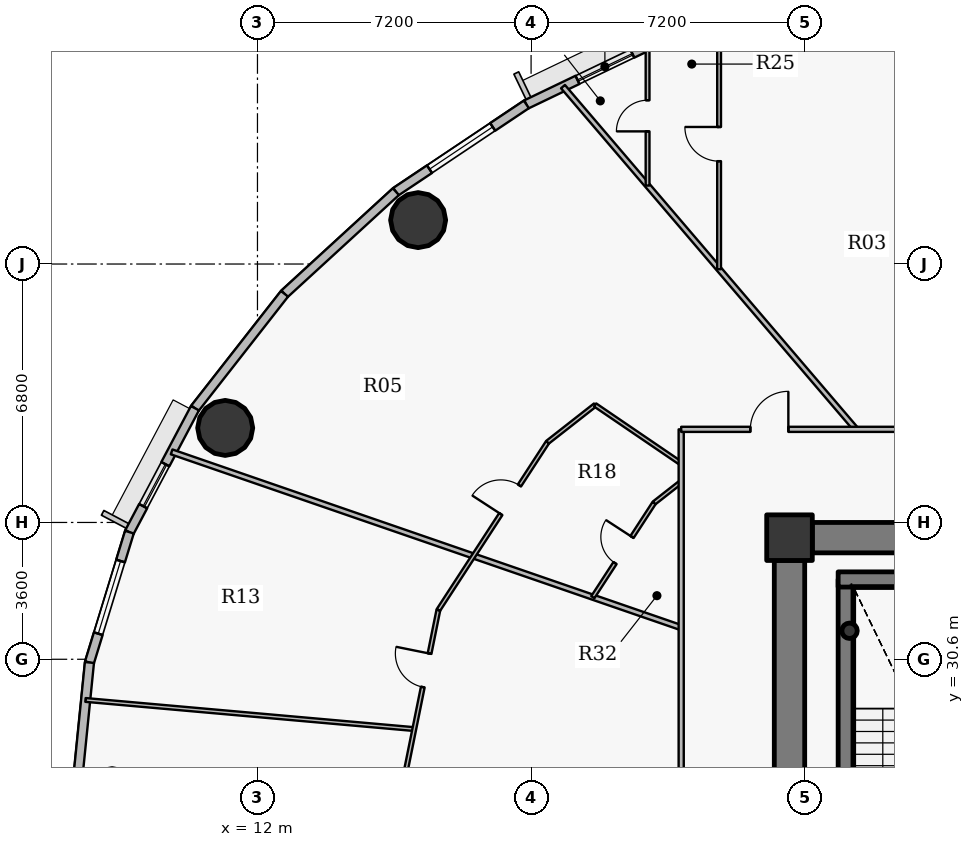
"""IFC4 building model, lengths in metres.
Left out: names, types, materials, properties, quantities, classifications, styles, units other than length and angle.
Written with IfcOpenShell. Run it as: python <this file> out.ifc"""

import sys

from ifc_helpers import new_model, si_unit, direction, frame, frame_2d, origin, origin_2d, place, context, subcontext, project, spatial, rectangle, hollow_circle, extrude, source, transform, mapped, element, fill, save


model = new_model("IFC4")
c1 = context("Model", 3, precision=1e-05, world=origin(), true_north=direction((0.0, 1.0)))
c2 = subcontext(c1, "Body", "Model", "MODEL_VIEW")
j1 = project(units=[si_unit("LENGTHUNIT", "METRE"), si_unit("PLANEANGLEUNIT", "RADIAN")], contexts=[c1])
p1 = place(None, origin())
s1 = spatial("IfcSite", under=j1, at=p1, CompositionType="ELEMENT")
p2 = place(p1, origin())
s2 = spatial("IfcBuilding", under=s1, at=p2, CompositionType="ELEMENT")
p3 = place(p2, frame((0.0, 0.0, 100.95)))
s3 = spatial("IfcBuildingStorey", under=s2, at=p3, CompositionType="ELEMENT", Elevation=100.95)
p4 = place(p3, frame((26.0, 33.8, 0.0), z_axis=(0.0, 0.0, 1.0), x_axis=(1.0, 0.0, 0.0)))
e1 = element("IfcColumn", 1, at=p4, inside=s3, PredefinedType="COLUMN", context=c2, shape_type="SweptSolid", body=[
    extrude(rectangle(XDim=1.2, YDim=1.2, at=origin_2d()), origin(), (0.0, 0.0, 1.0), 3.75),
])
p5 = place(p3, frame((27.48, 24.1, 0.0), z_axis=(0.0, 0.0, 1.0), x_axis=(0.0, 1.0, 0.0)))
e2 = element("IfcWall", 2, at=p5, inside=s3, PredefinedType="SHEAR", context=c2, shape_type="SweptSolid", body=[
    extrude(rectangle(XDim=8.6, YDim=0.4, at=frame_2d((4.3, 0.0))), origin(), (0.0, 0.0, 1.0), 3.75),
])
p6 = place(p3, frame((27.28, 32.7, 0.0), z_axis=(0.0, 0.0, 1.0), x_axis=(1.0, 0.0, 0.0)))
e3 = element("IfcWall", 3, at=p6, inside=s3, PredefinedType="SHEAR", context=c2, shape_type="SweptSolid", body=[
    extrude(rectangle(XDim=4.1, YDim=0.4, at=frame_2d((2.05, 0.0))), origin(), (0.0, 0.0, 1.0), 3.75),
])
p7 = place(p3, frame((27.58, 31.35, 0.0), z_axis=(0.0, 0.0, 1.0), x_axis=(1.0, 0.0, 0.0)))
e4 = element("IfcColumn", 4, at=p7, inside=s3, PredefinedType="COLUMN", context=c2, shape_type="SweptSolid", body=[
    extrude(hollow_circle(Radius=0.203, WallThickness=0.016, at=origin_2d()), origin(), (0.0, 0.0, 1.0), 3.75),
])
p8 = place(p3, frame((26.6, 33.8, 0.0), z_axis=(0.0, 0.0, 1.0), x_axis=(1.0, 0.0, 0.0)))
e5 = element("IfcWall", 5, at=p8, inside=s3, PredefinedType="SHEAR", context=c2, shape_type="SweptSolid", body=[
    extrude(rectangle(XDim=18.8, YDim=0.8, at=frame_2d((9.4, 0.0))), origin(), (0.0, 0.0, 1.0), 2.95),
])
p9 = place(p3, frame((26.0, 20.8, 0.0), z_axis=(0.0, 0.0, 1.0), x_axis=(0.0, 1.0, 0.0)))
e6 = element("IfcWall", 6, at=p9, inside=s3, PredefinedType="SHEAR", context=c2, shape_type="SweptSolid", body=[
    extrude(rectangle(XDim=12.4, YDim=0.8, at=frame_2d((6.2, 0.0))), origin(), (0.0, 0.0, 1.0), 2.95),
])
p10 = place(p9, frame((5.79, 0.0, 0.0)))
e7 = element("IfcOpeningElement", 7, at=p10, cuts=e6, PredefinedType="OPENING", context=c2, shape_type="SweptSolid", body=[
    extrude(rectangle(XDim=0.82, YDim=2.1, at=origin_2d()), frame((0.41, 0.41, 1.05), z_axis=(0.0, -1.0, 0.0), x_axis=(1.0, 0.0, 0.0)), (0.0, 0.0, 1.0), 0.82),
])
for number, where, z_axis, x_axis in (
    (8, (16.227, 42.156, 0.0), (0.0, 0.0, 1.0), (1.0, 0.0, 0.0)),
    (9, (11.151, 36.688, 0.0), (0.0, 0.0, 1.0), (1.0, 0.0, 0.0)),
):
    element("IfcColumn", number, at=place(p3, frame(where, z_axis=z_axis, x_axis=x_axis)), inside=s3, PredefinedType="COLUMN", context=c2, shape_type="SweptSolid", body=[
        extrude(hollow_circle(Radius=0.725, WallThickness=0.042, at=origin_2d()), origin(), (0.0, 0.0, 1.0), 3.75),
    ])
p11 = place(p3, frame((19.075, 45.199, 0.0), z_axis=(0.0, 0.0, 1.0), x_axis=(0.901589935876, 0.432591709962, 0.0)))
e10 = element("IfcWall", 10, at=p11, inside=s3, PredefinedType="SOLIDWALL", context=c2, shape_type="SweptSolid", body=[
    extrude(rectangle(XDim=4.272, YDim=0.24, at=frame_2d((2.136, 0.0))), origin(), (0.0, 0.0, 1.0), 3.5),
])
p12 = place(p11, frame((1.493, 0.0, 0.9)))
e11 = element("IfcOpeningElement", 11, at=p12, cuts=e10, PredefinedType="OPENING", context=c2, shape_type="SweptSolid", body=[
    extrude(rectangle(XDim=1.6, YDim=1.75, at=origin_2d()), frame((0.8, 0.13, 0.875), z_axis=(0.0, -1.0, 0.0), x_axis=(1.0, 0.0, 0.0)), (0.0, 0.0, 1.0), 0.26),
])
p13 = place(p3, frame((15.642, 42.903, 0.0), z_axis=(0.0, 0.0, 1.0), x_axis=(0.831221811447, 0.555940914284, 0.0)))
e12 = element("IfcWall", 12, at=p13, inside=s3, PredefinedType="SOLIDWALL", context=c2, shape_type="SweptSolid", body=[
    extrude(rectangle(XDim=4.13, YDim=0.24, at=frame_2d((2.065, 0.0))), origin(), (0.0, 0.0, 1.0), 3.5),
])
p14 = place(p13, frame((1.065, 0.0, 0.9)))
e13 = element("IfcOpeningElement", 13, at=p14, cuts=e12, PredefinedType="OPENING", context=c2, shape_type="SweptSolid", body=[
    extrude(rectangle(XDim=2.0, YDim=1.75, at=origin_2d()), frame((1.0, 0.13, 0.875), z_axis=(0.0, -1.0, 0.0), x_axis=(1.0, 0.0, 0.0)), (0.0, 0.0, 1.0), 0.26),
])
p15 = place(p3, frame((12.711, 40.217, 0.0), z_axis=(0.0, 0.0, 1.0), x_axis=(0.737113356241, 0.675769117414, 0.0)))
e14 = element("IfcWall", 14, at=p15, inside=s3, PredefinedType="SOLIDWALL", context=c2, shape_type="SweptSolid", body=[
    extrude(rectangle(XDim=3.976, YDim=0.24, at=frame_2d((1.988, 0.0))), origin(), (0.0, 0.0, 1.0), 3.5),
])
p16 = place(p3, frame((10.355, 37.206, 0.0), z_axis=(0.0, 0.0, 1.0), x_axis=(0.616272103517, 0.787533297345, 0.0)))
e15 = element("IfcWall", 15, at=p16, inside=s3, PredefinedType="SOLIDWALL", context=c2, shape_type="SweptSolid", body=[
    extrude(rectangle(XDim=3.823, YDim=0.24, at=frame_2d((1.912, 0.0))), origin(), (0.0, 0.0, 1.0), 3.5),
])
p17 = place(p3, frame((8.63, 33.945, 0.0), z_axis=(0.0, 0.0, 1.0), x_axis=(0.467614004126, 0.883932770716, 0.0)))
e16 = element("IfcWall", 16, at=p17, inside=s3, PredefinedType="SOLIDWALL", context=c2, shape_type="SweptSolid", body=[
    extrude(rectangle(XDim=3.689, YDim=0.24, at=frame_2d((1.844, 0.0))), origin(), (0.0, 0.0, 1.0), 3.5),
])
p18 = place(p17, frame((0.774, 0.0, 0.9)))
e17 = element("IfcOpeningElement", 17, at=p18, cuts=e16, PredefinedType="OPENING", context=c2, shape_type="SweptSolid", body=[
    extrude(rectangle(XDim=1.25, YDim=1.65, at=origin_2d()), frame((0.625, 0.13, 0.825), z_axis=(0.0, -1.0, 0.0), x_axis=(1.0, 0.0, 0.0)), (0.0, 0.0, 1.0), 0.26),
])
p19 = place(p3, frame((7.578, 30.515, 0.0), z_axis=(0.0, 0.0, 1.0), x_axis=(0.293124431344, 0.956074300329, 0.0)))
e18 = element("IfcWall", 18, at=p19, inside=s3, PredefinedType="SOLIDWALL", context=c2, shape_type="SweptSolid", body=[
    extrude(rectangle(XDim=3.587, YDim=0.24, at=frame_2d((1.793, 0.0))), origin(), (0.0, 0.0, 1.0), 3.5),
])
p20 = place(p19, frame((0.794, 0.0, 0.9)))
e19 = element("IfcOpeningElement", 19, at=p20, cuts=e18, PredefinedType="OPENING", context=c2, shape_type="SweptSolid", body=[
    extrude(rectangle(XDim=2.0, YDim=1.75, at=origin_2d()), frame((1.0, 0.13, 0.875), z_axis=(0.0, -1.0, 0.0), x_axis=(1.0, 0.0, 0.0)), (0.0, 0.0, 1.0), 0.26),
])
p21 = place(p3, frame((7.225, 27.0, 0.0), z_axis=(0.0, 0.0, 1.0), x_axis=(0.099989468229, 0.994988495533, 0.0)))
e20 = element("IfcWall", 20, at=p21, inside=s3, PredefinedType="SOLIDWALL", context=c2, shape_type="SweptSolid", body=[
    extrude(rectangle(XDim=3.533, YDim=0.24, at=frame_2d((1.767, 0.0))), origin(), (0.0, 0.0, 1.0), 3.5),
])
p22 = place(p3, frame((7.474, 29.53, 0.0), z_axis=(0.0, 0.0, 1.0), x_axis=(0.99609030315, -0.088340862406, 0.0)))
e21 = element("IfcWall", 21, at=p22, inside=s3, PredefinedType="PARTITIONING", context=c2, shape_type="SweptSolid", body=[
    extrude(rectangle(XDim=8.686, YDim=0.1, at=frame_2d((4.343, 0.0))), origin(), (0.0, 0.0, 1.0), 2.935),
])
p23 = place(p3, frame((9.741, 36.057, 0.0), z_axis=(0.0, 0.0, 1.0), x_axis=(0.945349748634, -0.326058051207, 0.0)))
e22 = element("IfcWall", 22, at=p23, inside=s3, PredefinedType="PARTITIONING", context=c2, shape_type="SweptSolid", body=[
    extrude(rectangle(XDim=14.184, YDim=0.135, at=frame_2d((7.092, 0.0))), origin(), (0.0, 0.0, 1.0), 2.935),
])
p24 = place(p3, frame((15.77, 27.0, 0.0), z_axis=(0.0, 0.0, 1.0), x_axis=(0.198230919145, 0.980155346205, 0.0)))
e23 = element("IfcWall", 23, at=p24, inside=s3, PredefinedType="PARTITIONING", context=c2, shape_type="SweptSolid", body=[
    extrude(rectangle(XDim=4.994, YDim=0.1, at=frame_2d((2.497, 0.0))), origin(), (0.0, 0.0, 1.0), 2.935),
])
p25 = place(p24, frame((2.926, 0.0, 0.0)))
e24 = element("IfcOpeningElement", 24, at=p25, cuts=e23, PredefinedType="OPENING", context=c2, shape_type="SweptSolid", body=[
    extrude(rectangle(XDim=0.9, YDim=2.1, at=origin_2d()), frame((0.45, 0.06, 1.05), z_axis=(0.0, -1.0, 0.0), x_axis=(1.0, 0.0, 0.0)), (0.0, 0.0, 1.0), 0.12),
])
p26 = place(p3, frame((16.76, 31.895, 0.0), z_axis=(0.0, 0.0, 1.0), x_axis=(0.545405249109, 0.838172484781, 0.0)))
e25 = element("IfcWall", 25, at=p26, inside=s3, PredefinedType="PARTITIONING", context=c2, shape_type="SweptSolid", body=[
    extrude(rectangle(XDim=5.269, YDim=0.1, at=frame_2d((2.634, 0.0))), origin(), (0.0, 0.0, 1.0), 2.935),
])
p27 = place(p26, frame((3.012, 0.0, 0.0)))
e26 = element("IfcOpeningElement", 26, at=p27, cuts=e25, PredefinedType="OPENING", context=c2, shape_type="SweptSolid", body=[
    extrude(rectangle(XDim=0.9, YDim=2.1, at=origin_2d()), frame((0.45, 0.06, 1.05), z_axis=(0.0, -1.0, 0.0), x_axis=(1.0, 0.0, 0.0)), (0.0, 0.0, 1.0), 0.12),
])
p28 = place(p3, frame((19.634, 36.311, 0.0), z_axis=(0.0, 0.0, 1.0), x_axis=(0.787313775385, 0.616552527437, 0.0)))
e27 = element("IfcWall", 27, at=p28, inside=s3, PredefinedType="PARTITIONING", context=c2, shape_type="SweptSolid", body=[
    extrude(rectangle(XDim=1.59, YDim=0.1, at=frame_2d((0.795, 0.0))), origin(), (0.0, 0.0, 1.0), 3.5),
])
p29 = place(p3, frame((20.04, 45.668, 0.0), z_axis=(0.0, 0.0, 1.0), x_axis=(0.649828321201, -0.760081017369, 0.0)))
e28 = element("IfcWall", 28, at=p29, inside=s3, PredefinedType="PARTITIONING", context=c2, shape_type="SweptSolid", body=[
    extrude(rectangle(XDim=11.865, YDim=0.135, at=frame_2d((5.932, 0.0))), origin(), (0.0, 0.0, 1.0), 2.935),
])
p30 = place(p3, frame((20.825, 32.234, 0.0), z_axis=(0.0, 0.0, 1.0), x_axis=(0.545376787896, 0.838191004023, 0.0)))
e29 = element("IfcWall", 29, at=p30, inside=s3, PredefinedType="PARTITIONING", context=c2, shape_type="SweptSolid", body=[
    extrude(rectangle(XDim=2.96, YDim=0.1, at=frame_2d((1.48, 0.0))), origin(), (0.0, 0.0, 1.0), 2.935),
])
p31 = place(p30, frame((1.07, 0.0, 0.0)))
e30 = element("IfcOpeningElement", 30, at=p31, cuts=e29, PredefinedType="OPENING", context=c2, shape_type="SweptSolid", body=[
    extrude(rectangle(XDim=0.82, YDim=2.1, at=origin_2d()), frame((0.41, 0.06, 1.05), z_axis=(0.0, -1.0, 0.0), x_axis=(1.0, 0.0, 0.0)), (0.0, 0.0, 1.0), 0.12),
])
p32 = place(p3, frame((20.885, 37.291, 0.0), z_axis=(0.0, 0.0, 1.0), x_axis=(0.826581607155, -0.562816885596, 0.0)))
e31 = element("IfcWall", 31, at=p32, inside=s3, PredefinedType="PARTITIONING", context=c2, shape_type="SweptSolid", body=[
    extrude(rectangle(XDim=2.74, YDim=0.1, at=frame_2d((1.37, 0.0))), origin(), (0.0, 0.0, 1.0), 3.5),
])
p33 = place(p3, frame((22.265, 43.064, 0.0), z_axis=(0.0, 0.0, 1.0), x_axis=(0.0, 1.0, 0.0)))
e32 = element("IfcWall", 32, at=p33, inside=s3, PredefinedType="PARTITIONING", context=c2, shape_type="SweptSolid", body=[
    extrude(rectangle(XDim=3.671, YDim=0.1, at=frame_2d((1.836, 0.0))), origin(), (0.0, 0.0, 1.0), 2.935),
])
p34 = place(p33, frame((1.426, 0.0, 0.0)))
e33 = element("IfcOpeningElement", 33, at=p34, cuts=e32, PredefinedType="OPENING", context=c2, shape_type="SweptSolid", body=[
    extrude(rectangle(XDim=0.82, YDim=2.1, at=origin_2d()), frame((0.41, 0.06, 1.05), z_axis=(0.0, -1.0, 0.0), x_axis=(1.0, 0.0, 0.0)), (0.0, 0.0, 1.0), 0.12),
])
p35 = place(p3, frame((22.439, 34.715, 0.0), z_axis=(0.0, 0.0, 1.0), x_axis=(0.787265250498, 0.616614486821, 0.0)))
e34 = element("IfcWall", 34, at=p35, inside=s3, PredefinedType="PARTITIONING", context=c2, shape_type="SweptSolid", body=[
    extrude(rectangle(XDim=0.903, YDim=0.1, at=frame_2d((0.451, 0.0))), origin(), (0.0, 0.0, 1.0), 3.5),
])
p36 = place(p3, frame((23.15, 17.35, 0.0), z_axis=(0.0, 0.0, 1.0), x_axis=(0.0, 1.0, 0.0)))
e35 = element("IfcWall", 35, at=p36, inside=s3, PredefinedType="PARTITIONING", context=c2, shape_type="SweptSolid", body=[
    extrude(rectangle(XDim=19.3, YDim=0.135, at=frame_2d((9.65, 0.0))), origin(), (0.0, 0.0, 1.0), 2.935),
])
p37 = place(p36, frame((7.86, 0.0, 0.0)))
e36 = element("IfcOpeningElement", 36, at=p37, cuts=e35, PredefinedType="OPENING", context=c2, shape_type="SweptSolid", body=[
    extrude(rectangle(XDim=1.0, YDim=2.15, at=origin_2d()), frame((0.5, 0.078, 1.075), z_axis=(0.0, -1.0, 0.0), x_axis=(1.0, 0.0, 0.0)), (0.0, 0.0, 1.0), 0.155),
])
p38 = place(p3, frame((23.15, 36.65, 0.0), z_axis=(0.0, 0.0, 1.0), x_axis=(1.0, 0.0, 0.0)))
e37 = element("IfcWall", 37, at=p38, inside=s3, PredefinedType="PARTITIONING", context=c2, shape_type="SweptSolid", body=[
    extrude(rectangle(XDim=10.373, YDim=0.135, at=frame_2d((5.187, 0.0))), origin(), (0.0, 0.0, 1.0), 2.935),
])
p39 = place(p38, frame((6.966, 0.0, 0.0)))
e38 = element("IfcOpeningElement", 38, at=p39, cuts=e37, PredefinedType="OPENING", context=c2, shape_type="SweptSolid", body=[
    extrude(rectangle(XDim=1.0, YDim=2.15, at=origin_2d()), frame((0.5, 0.078, 1.075), z_axis=(0.0, -1.0, 0.0), x_axis=(1.0, 0.0, 0.0)), (0.0, 0.0, 1.0), 0.155),
])
p40 = place(p38, frame((1.82, 0.0, 0.0)))
e39 = element("IfcOpeningElement", 39, at=p40, cuts=e37, PredefinedType="OPENING", context=c2, shape_type="SweptSolid", body=[
    extrude(rectangle(XDim=1.0, YDim=2.15, at=origin_2d()), frame((0.5, 0.078, 1.075), z_axis=(0.0, -1.0, 0.0), x_axis=(1.0, 0.0, 0.0)), (0.0, 0.0, 1.0), 0.155),
])
p41 = place(p3, frame((24.147, 40.864, 0.0), z_axis=(0.0, 0.0, 1.0), x_axis=(0.0, 1.0, 0.0)))
e40 = element("IfcWall", 40, at=p41, inside=s3, PredefinedType="PARTITIONING", context=c2, shape_type="SweptSolid", body=[
    extrude(rectangle(XDim=6.585, YDim=0.1, at=frame_2d((3.292, 0.0))), origin(), (0.0, 0.0, 1.0), 2.935),
])
p42 = place(p41, frame((2.843, 0.0, 0.0)))
e41 = element("IfcOpeningElement", 41, at=p42, cuts=e40, PredefinedType="OPENING", context=c2, shape_type="SweptSolid", body=[
    extrude(rectangle(XDim=0.9, YDim=2.1, at=origin_2d()), frame((0.45, 0.06, 1.05), z_axis=(0.0, -1.0, 0.0), x_axis=(1.0, 0.0, 0.0)), (0.0, 0.0, 1.0), 0.12),
])
p43 = place(p3, frame((26.59, 34.2, 0.0), z_axis=(0.0, 0.0, 1.0), x_axis=(-1.0, 0.0, 0.0)))
e42 = element("IfcWall", 42, at=p43, inside=s3, PredefinedType="PARTITIONING", context=c2, shape_type="SweptSolid", body=[
    extrude(rectangle(XDim=0.99, YDim=0.135, at=frame_2d((0.495, 0.0))), origin(), (0.0, 0.0, 1.0), 2.935),
])
p44 = place(p3, frame((25.6, 33.893, 0.0), z_axis=(0.0, 0.0, 1.0), x_axis=(0.0, -1.0, 0.0)))
e43 = element("IfcWall", 43, at=p44, inside=s3, PredefinedType="PARTITIONING", context=c2, shape_type="SweptSolid", body=[
    extrude(rectangle(XDim=0.683, YDim=0.135, at=frame_2d((0.341, 0.0))), origin(), (0.0, 0.0, 1.0), 3.5),
])
m1 = source(origin(), c2, "Body", "SweptSolid", [
    extrude(rectangle(XDim=1.6, YDim=1.75, at=origin_2d()), frame((0.8, 0.03, 0.875), z_axis=(0.0, -1.0, 0.0), x_axis=(1.0, 0.0, 0.0)), (0.0, 0.0, 1.0), 0.06),
])
p45 = place(p12, origin())
e44 = element("IfcWindow", 44, at=p45, inside=s3, PartitioningType="DOUBLE_PANEL_VERTICAL", PredefinedType="WINDOW", context=c2, shape_type="MappedRepresentation", body=[
    mapped(m1, transform((0.0, 0.0, 0.0), x_axis=(1.0, 0.0, 0.0), y_axis=(0.0, 1.0, 0.0), z_axis=(0.0, 0.0, 1.0), scale=1.0)),
])
fill(e11, e44)
m2 = source(origin(), c2, "Body", "SweptSolid", [
    extrude(rectangle(XDim=2.0, YDim=1.75, at=origin_2d()), frame((1.0, 0.03, 0.875), z_axis=(0.0, -1.0, 0.0), x_axis=(1.0, 0.0, 0.0)), (0.0, 0.0, 1.0), 0.06),
])
p46 = place(p14, origin())
e45 = element("IfcWindow", 45, at=p46, inside=s3, PartitioningType="DOUBLE_PANEL_VERTICAL", PredefinedType="WINDOW", context=c2, shape_type="MappedRepresentation", body=[
    mapped(m2, transform((0.0, 0.0, 0.0), x_axis=(1.0, 0.0, 0.0), y_axis=(0.0, 1.0, 0.0), z_axis=(0.0, 0.0, 1.0), scale=1.0)),
])
fill(e13, e45)
m3 = source(origin(), c2, "Body", "SweptSolid", [
    extrude(rectangle(XDim=1.25, YDim=1.65, at=origin_2d()), frame((0.625, 0.03, 0.825), z_axis=(0.0, -1.0, 0.0), x_axis=(1.0, 0.0, 0.0)), (0.0, 0.0, 1.0), 0.06),
])
p47 = place(p18, origin())
e46 = element("IfcWindow", 46, at=p47, inside=s3, PartitioningType="SINGLE_PANEL", PredefinedType="WINDOW", context=c2, shape_type="MappedRepresentation", body=[
    mapped(m3, transform((0.0, 0.0, 0.0), x_axis=(1.0, 0.0, 0.0), y_axis=(0.0, 1.0, 0.0), z_axis=(0.0, 0.0, 1.0), scale=1.0)),
])
fill(e17, e46)
p48 = place(p20, origin())
e47 = element("IfcWindow", 47, at=p48, inside=s3, PartitioningType="DOUBLE_PANEL_VERTICAL", PredefinedType="WINDOW", context=c2, shape_type="MappedRepresentation", body=[
    mapped(m2, transform((0.0, 0.0, 0.0), x_axis=(1.0, 0.0, 0.0), y_axis=(0.0, 1.0, 0.0), z_axis=(0.0, 0.0, 1.0), scale=1.0)),
])
fill(e19, e47)
m4 = source(origin(), c2, "Body", "SweptSolid", [
    extrude(rectangle(XDim=0.9, YDim=2.1, at=origin_2d()), frame((0.45, 0.025, 1.05), z_axis=(0.0, -1.0, 0.0), x_axis=(1.0, 0.0, 0.0)), (0.0, 0.0, 1.0), 0.05),
])
p49 = place(p42, origin())
e48 = element("IfcDoor", 48, at=p49, inside=s3, OperationType="SINGLE_SWING_RIGHT", PredefinedType="DOOR", context=c2, shape_type="MappedRepresentation", body=[
    mapped(m4, transform((0.0, 0.0, 0.0), x_axis=(1.0, 0.0, 0.0), y_axis=(0.0, 1.0, 0.0), z_axis=(0.0, 0.0, 1.0), scale=1.0)),
])
fill(e41, e48)
m5 = source(origin(), c2, "Body", "SweptSolid", [
    extrude(rectangle(XDim=0.82, YDim=2.1, at=origin_2d()), frame((0.41, 0.025, 1.05), z_axis=(0.0, -1.0, 0.0), x_axis=(1.0, 0.0, 0.0)), (0.0, 0.0, 1.0), 0.05),
])
p50 = place(p34, origin())
e49 = element("IfcDoor", 49, at=p50, inside=s3, OperationType="SINGLE_SWING_LEFT", PredefinedType="DOOR", context=c2, shape_type="MappedRepresentation", body=[
    mapped(m5, transform((0.0, 0.0, 0.0), x_axis=(1.0, 0.0, 0.0), y_axis=(0.0, 1.0, 0.0), z_axis=(0.0, 0.0, 1.0), scale=1.0)),
])
fill(e33, e49)
m6 = source(origin(), c2, "Body", "SweptSolid", [
    extrude(rectangle(XDim=1.0, YDim=2.15, at=origin_2d()), frame((0.5, 0.025, 1.075), z_axis=(0.0, -1.0, 0.0), x_axis=(1.0, 0.0, 0.0)), (0.0, 0.0, 1.0), 0.05),
])
p51 = place(p40, origin())
e50 = element("IfcDoor", 50, at=p51, inside=s3, OperationType="SINGLE_SWING_RIGHT", PredefinedType="DOOR", context=c2, shape_type="MappedRepresentation", body=[
    mapped(m6, transform((0.0, 0.0, 0.0), x_axis=(1.0, 0.0, 0.0), y_axis=(0.0, 1.0, 0.0), z_axis=(0.0, 0.0, 1.0), scale=1.0)),
])
fill(e39, e50)
p52 = place(p27, origin())
e51 = element("IfcDoor", 51, at=p52, inside=s3, OperationType="SINGLE_SWING_LEFT", PredefinedType="DOOR", context=c2, shape_type="MappedRepresentation", body=[
    mapped(m4, transform((0.0, 0.0, 0.0), x_axis=(1.0, 0.0, 0.0), y_axis=(0.0, 1.0, 0.0), z_axis=(0.0, 0.0, 1.0), scale=1.0)),
])
fill(e26, e51)
p53 = place(p31, origin())
e52 = element("IfcDoor", 52, at=p53, inside=s3, OperationType="SINGLE_SWING_RIGHT", PredefinedType="DOOR", context=c2, shape_type="MappedRepresentation", body=[
    mapped(m5, transform((0.0, 0.0, 0.0), x_axis=(1.0, 0.0, 0.0), y_axis=(0.0, 1.0, 0.0), z_axis=(0.0, 0.0, 1.0), scale=1.0)),
])
fill(e30, e52)
p54 = place(p25, origin())
e53 = element("IfcDoor", 53, at=p54, inside=s3, OperationType="SINGLE_SWING_RIGHT", PredefinedType="DOOR", context=c2, shape_type="MappedRepresentation", body=[
    mapped(m4, transform((0.0, 0.0, 0.0), x_axis=(1.0, 0.0, 0.0), y_axis=(0.0, 1.0, 0.0), z_axis=(0.0, 0.0, 1.0), scale=1.0)),
])
fill(e24, e53)
save(model, sys.argv[1])
